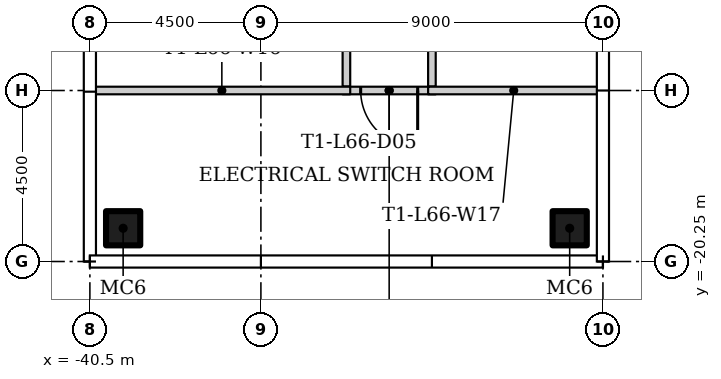
"""IFC4 building model, lengths in metres.
Left out: names, types, materials, properties, quantities, classifications, styles, units other than length and angle.
Written with IfcOpenShell. Run it as: python <this file> out.ifc"""

import sys

from ifc_helpers import new_model, si_unit, direction, frame, frame_2d, origin, origin_2d, place, context, subcontext, project, spatial, rectangle, hollow_rectangle, extrude, element, fill, save


model = new_model("IFC4")
c1 = context("Model", 3, precision=1e-05, world=origin(), true_north=direction((0.0, 1.0)))
c2 = subcontext(c1, "Body", "Model", "MODEL_VIEW")
j1 = project(units=[si_unit("LENGTHUNIT", "METRE"), si_unit("PLANEANGLEUNIT", "RADIAN")], contexts=[c1])
p1 = place(None, origin())
s1 = spatial("IfcSite", under=j1, at=p1, CompositionType="ELEMENT")
p2 = place(p1, origin())
s2 = spatial("IfcBuilding", under=s1, at=p2, CompositionType="ELEMENT")
p3 = place(p2, frame((0.0, 0.0, 273.3)))
s3 = spatial("IfcBuildingStorey", under=s2, at=p3, CompositionType="ELEMENT", Elevation=273.3)
for number, where in (
    (1, (-39.625, -19.375, 0.0)),
    (2, (-27.875, -19.375, 0.0)),
):
    element("IfcColumn", number, at=place(p3, frame(where)), inside=s3, PredefinedType="COLUMN", context=c2, shape_type="SweptSolid", body=[
        extrude(hollow_rectangle(XDim=0.9, YDim=0.9, WallThickness=0.036, at=origin_2d()), origin(), (0.0, 0.0, 1.0), 4.55),
    ])
p4 = place(p3, frame((-31.5, -0.05, 0.0), z_axis=(0.0, 0.0, 1.0), x_axis=(0.0, -1.0, 0.0)))
e3 = element("IfcWall", 3, at=p4, inside=s3, PredefinedType="PARTITIONING", context=c2, shape_type="SweptSolid", body=[
    extrude(rectangle(XDim=15.6, YDim=0.2, at=frame_2d((7.8, 0.0))), origin(), (0.0, 0.0, 1.0), 4.55),
])
p5 = place(p4, frame((2.55, 0.0, 0.0)))
e4 = element("IfcOpeningElement", 4, at=p5, cuts=e3, PredefinedType="OPENING", context=c2, shape_type="SweptSolid", body=[
    extrude(rectangle(XDim=1.5, YDim=2.4, at=frame_2d((0.75, 1.2))), frame((0.0, 0.11, 0.0), z_axis=(0.0, -1.0, 0.0), x_axis=(1.0, 0.0, 0.0)), (0.0, 0.0, 1.0), 0.22),
])
p6 = place(p4, frame((8.2, 0.0, 0.0)))
e5 = element("IfcOpeningElement", 5, at=p6, cuts=e3, PredefinedType="OPENING", context=c2, shape_type="SweptSolid", body=[
    extrude(rectangle(XDim=1.5, YDim=2.4, at=frame_2d((0.75, 1.2))), frame((0.0, 0.11, 0.0), z_axis=(0.0, -1.0, 0.0), x_axis=(1.0, 0.0, 0.0)), (0.0, 0.0, 1.0), 0.22),
])
p7 = place(p4, frame((12.7, 0.0, 0.0)))
e6 = element("IfcOpeningElement", 6, at=p7, cuts=e3, PredefinedType="OPENING", context=c2, shape_type="SweptSolid", body=[
    extrude(rectangle(XDim=1.5, YDim=2.4, at=frame_2d((0.75, 1.2))), frame((0.0, 0.11, 0.0), z_axis=(0.0, -1.0, 0.0), x_axis=(1.0, 0.0, 0.0)), (0.0, 0.0, 1.0), 0.22),
])
p8 = place(p3, frame((-33.75, -15.65, 0.0), z_axis=(0.0, 0.0, 1.0), x_axis=(0.0, 1.0, 0.0)))
e7 = element("IfcWall", 7, at=p8, inside=s3, PredefinedType="PARTITIONING", context=c2, shape_type="SweptSolid", body=[
    extrude(rectangle(XDim=15.6, YDim=0.2, at=frame_2d((7.8, 0.0))), origin(), (0.0, 0.0, 1.0), 4.55),
])
p9 = place(p8, frame((3.65, 0.0, 0.0)))
e8 = element("IfcOpeningElement", 8, at=p9, cuts=e7, PredefinedType="OPENING", context=c2, shape_type="SweptSolid", body=[
    extrude(rectangle(XDim=1.5, YDim=2.4, at=frame_2d((0.75, 1.2))), frame((0.0, 0.11, 0.0), z_axis=(0.0, -1.0, 0.0), x_axis=(1.0, 0.0, 0.0)), (0.0, 0.0, 1.0), 0.22),
])
p10 = place(p8, frame((11.55, 0.0, 0.0)))
e9 = element("IfcOpeningElement", 9, at=p10, cuts=e7, PredefinedType="OPENING", context=c2, shape_type="SweptSolid", body=[
    extrude(rectangle(XDim=1.5, YDim=2.4, at=frame_2d((0.75, 1.2))), frame((0.0, 0.11, 0.0), z_axis=(0.0, -1.0, 0.0), x_axis=(1.0, 0.0, 0.0)), (0.0, 0.0, 1.0), 0.22),
])
p11 = place(p3, frame((-31.4, -15.75, 0.0), z_axis=(0.0, 0.0, 1.0), x_axis=(-1.0, 0.0, 0.0)))
e10 = element("IfcWall", 10, at=p11, inside=s3, PredefinedType="PARTITIONING", context=c2, shape_type="SweptSolid", body=[
    extrude(rectangle(XDim=2.45, YDim=0.2, at=frame_2d((1.225, 0.0))), origin(), (0.0, 0.0, 1.0), 4.55),
])
p12 = place(p11, frame((0.475, 0.0, 0.0)))
e11 = element("IfcOpeningElement", 11, at=p12, cuts=e10, PredefinedType="OPENING", context=c2, shape_type="SweptSolid", body=[
    extrude(rectangle(XDim=1.5, YDim=2.4, at=frame_2d((0.75, 1.2))), frame((0.0, 0.11, 0.0), z_axis=(0.0, -1.0, 0.0), x_axis=(1.0, 0.0, 0.0)), (0.0, 0.0, 1.0), 0.22),
])
p13 = place(p3, frame((-40.405, -15.75, 0.0)))
e12 = element("IfcWall", 12, at=p13, inside=s3, PredefinedType="PARTITIONING", context=c2, shape_type="SweptSolid", body=[
    extrude(rectangle(XDim=6.755, YDim=0.2, at=frame_2d((3.377, 0.0))), origin(), (0.0, 0.0, 1.0), 4.55),
])
p14 = place(p3, frame((-31.6, -15.75, 0.0)))
e13 = element("IfcWall", 13, at=p14, inside=s3, PredefinedType="PARTITIONING", context=c2, shape_type="SweptSolid", body=[
    extrude(rectangle(XDim=4.505, YDim=0.2, at=frame_2d((2.252, 0.0))), origin(), (0.0, 0.0, 1.0), 4.55),
])
p15 = place(p12, origin())
e14 = element("IfcDoor", 14, at=p15, inside=s3, OperationType="DOUBLE_DOOR_SINGLE_SWING", PredefinedType="DOOR", context=c2, shape_type="SweptSolid", body=[
    extrude(rectangle(XDim=1.5, YDim=2.4, at=frame_2d((0.75, 1.2))), frame((0.0, 0.025, 0.0), z_axis=(0.0, -1.0, 0.0), x_axis=(1.0, 0.0, 0.0)), (0.0, 0.0, 1.0), 0.05),
])
fill(e11, e14)
save(model, sys.argv[1])
